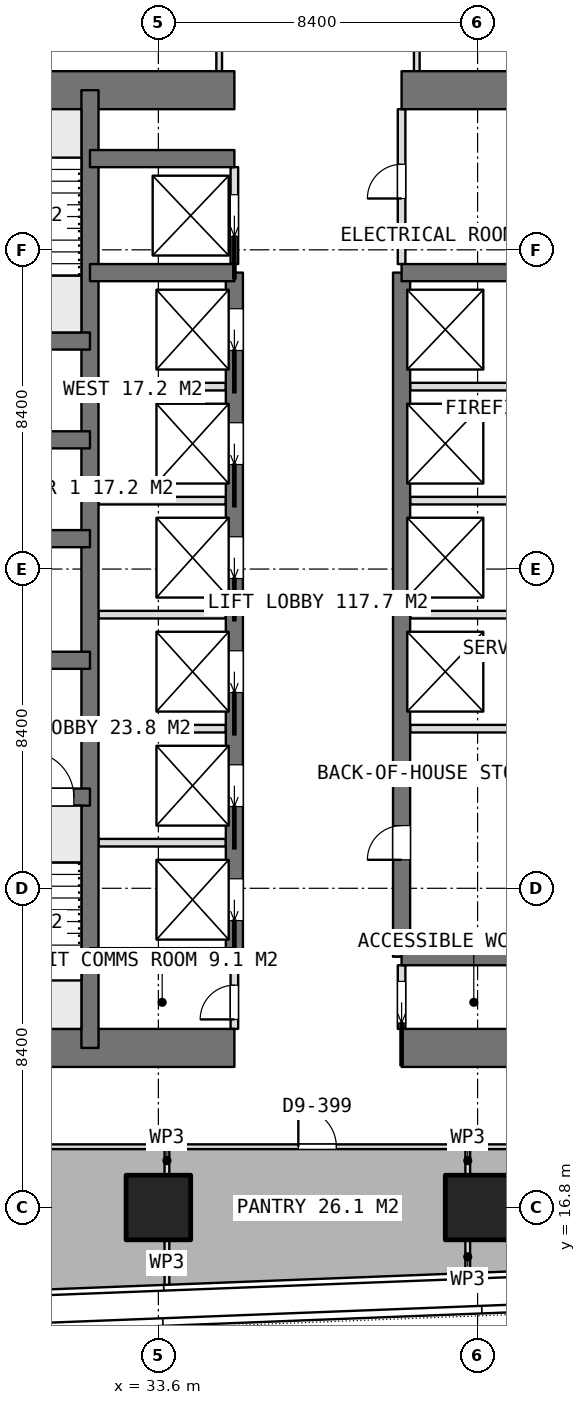
"""IFC4 building model, lengths in metres.
Left out: names, types, materials, properties, quantities, classifications, styles, units other than length and angle.
Written with IfcOpenShell. Run it as: python <this file> out.ifc"""

import sys

from ifc_helpers import new_model, si_unit, direction, frame, frame_2d, origin, origin_2d, place, context, subcontext, project, spatial, rectangle, extrude, element, fill, save


model = new_model("IFC4")
c1 = context("Model", 3, precision=1e-05, world=origin(), true_north=direction((0.0, 1.0)))
c2 = subcontext(c1, "Body", "Model", "MODEL_VIEW")
j1 = project(units=[si_unit("LENGTHUNIT", "METRE"), si_unit("PLANEANGLEUNIT", "RADIAN")], contexts=[c1])
p1 = place(None, origin())
s1 = spatial("IfcSite", under=j1, at=p1, CompositionType="ELEMENT")
p2 = place(p1, origin())
s2 = spatial("IfcBuilding", under=s1, at=p2, CompositionType="ELEMENT")
p3 = place(p2, frame((0.0, 0.0, 114.05)))
s3 = spatial("IfcBuildingStorey", under=s2, at=p3, CompositionType="ELEMENT", Elevation=114.05)
p4 = place(p3, frame((25.2, 21.0, 0.0), z_axis=(0.0, 0.0, 1.0), x_axis=(1.0, 0.0, 0.0)))
e1 = element("IfcWall", 1, at=p4, inside=s3, PredefinedType="SHEAR", context=c2, shape_type="SweptSolid", body=[
    extrude(rectangle(XDim=10.4, YDim=1.0, at=frame_2d((5.2, 0.0))), origin(), (0.0, 0.0, 1.0), 3.75),
])
p5 = place(p3, frame((40.0, 21.0, 0.0), z_axis=(0.0, 0.0, 1.0), x_axis=(1.0, 0.0, 0.0)))
e2 = element("IfcWall", 2, at=p5, inside=s3, PredefinedType="SHEAR", context=c2, shape_type="SweptSolid", body=[
    extrude(rectangle(XDim=10.4, YDim=1.0, at=frame_2d((5.2, 0.0))), origin(), (0.0, 0.0, 1.0), 3.75),
])
p6 = place(p3, frame((25.2, 46.2, 0.0), z_axis=(0.0, 0.0, 1.0), x_axis=(1.0, 0.0, 0.0)))
e3 = element("IfcWall", 3, at=p6, inside=s3, PredefinedType="SHEAR", context=c2, shape_type="SweptSolid", body=[
    extrude(rectangle(XDim=10.4, YDim=1.0, at=frame_2d((5.2, 0.0))), origin(), (0.0, 0.0, 1.0), 3.75),
])
p7 = place(p3, frame((40.0, 46.2, 0.0), z_axis=(0.0, 0.0, 1.0), x_axis=(1.0, 0.0, 0.0)))
e4 = element("IfcWall", 4, at=p7, inside=s3, PredefinedType="SHEAR", context=c2, shape_type="SweptSolid", body=[
    extrude(rectangle(XDim=10.4, YDim=1.0, at=frame_2d((5.2, 0.0))), origin(), (0.0, 0.0, 1.0), 3.75),
])
p8 = place(p3, frame((31.8, 21.0, 0.0), z_axis=(0.0, 0.0, 1.0), x_axis=(0.0, 1.0, 0.0)))
e5 = element("IfcWall", 5, at=p8, inside=s3, PredefinedType="SHEAR", context=c2, shape_type="SweptSolid", body=[
    extrude(rectangle(XDim=25.2, YDim=0.45, at=frame_2d((12.6, 0.0))), origin(), (0.0, 0.0, 1.0), 3.75),
])
p9 = place(p3, frame((35.6, 23.4, 0.0), z_axis=(0.0, 0.0, 1.0), x_axis=(0.0, 1.0, 0.0)))
e6 = element("IfcWall", 6, at=p9, inside=s3, PredefinedType="SHEAR", context=c2, shape_type="SweptSolid", body=[
    extrude(rectangle(XDim=18.0, YDim=0.45, at=frame_2d((9.0, 0.0))), origin(), (0.0, 0.0, 1.0), 3.75),
])
p10 = place(p9, frame((0.95, 0.0, 0.0)))
e7 = element("IfcOpeningElement", 7, at=p10, cuts=e6, PredefinedType="OPENING", context=c2, shape_type="SweptSolid", body=[
    extrude(rectangle(XDim=1.1, YDim=2.1, at=frame_2d((0.55, 1.05))), frame((0.0, 0.235, 0.0), z_axis=(0.0, -1.0, 0.0), x_axis=(1.0, 0.0, 0.0)), (0.0, 0.0, 1.0), 0.47),
])
p11 = place(p9, frame((3.95, 0.0, 0.0)))
e8 = element("IfcOpeningElement", 8, at=p11, cuts=e6, PredefinedType="OPENING", context=c2, shape_type="SweptSolid", body=[
    extrude(rectangle(XDim=1.1, YDim=2.1, at=frame_2d((0.55, 1.05))), frame((0.0, 0.235, 0.0), z_axis=(0.0, -1.0, 0.0), x_axis=(1.0, 0.0, 0.0)), (0.0, 0.0, 1.0), 0.47),
])
p12 = place(p9, frame((6.95, 0.0, 0.0)))
e9 = element("IfcOpeningElement", 9, at=p12, cuts=e6, PredefinedType="OPENING", context=c2, shape_type="SweptSolid", body=[
    extrude(rectangle(XDim=1.1, YDim=2.1, at=frame_2d((0.55, 1.05))), frame((0.0, 0.235, 0.0), z_axis=(0.0, -1.0, 0.0), x_axis=(1.0, 0.0, 0.0)), (0.0, 0.0, 1.0), 0.47),
])
p13 = place(p9, frame((9.95, 0.0, 0.0)))
e10 = element("IfcOpeningElement", 10, at=p13, cuts=e6, PredefinedType="OPENING", context=c2, shape_type="SweptSolid", body=[
    extrude(rectangle(XDim=1.1, YDim=2.1, at=frame_2d((0.55, 1.05))), frame((0.0, 0.235, 0.0), z_axis=(0.0, -1.0, 0.0), x_axis=(1.0, 0.0, 0.0)), (0.0, 0.0, 1.0), 0.47),
])
p14 = place(p9, frame((12.95, 0.0, 0.0)))
e11 = element("IfcOpeningElement", 11, at=p14, cuts=e6, PredefinedType="OPENING", context=c2, shape_type="SweptSolid", body=[
    extrude(rectangle(XDim=1.1, YDim=2.1, at=frame_2d((0.55, 1.05))), frame((0.0, 0.235, 0.0), z_axis=(0.0, -1.0, 0.0), x_axis=(1.0, 0.0, 0.0)), (0.0, 0.0, 1.0), 0.47),
])
p15 = place(p9, frame((15.95, 0.0, 0.0)))
e12 = element("IfcOpeningElement", 12, at=p15, cuts=e6, PredefinedType="OPENING", context=c2, shape_type="SweptSolid", body=[
    extrude(rectangle(XDim=1.1, YDim=2.1, at=frame_2d((0.55, 1.05))), frame((0.0, 0.235, 0.0), z_axis=(0.0, -1.0, 0.0), x_axis=(1.0, 0.0, 0.0)), (0.0, 0.0, 1.0), 0.47),
])
p16 = place(p3, frame((40.0, 23.4, 0.0), z_axis=(0.0, 0.0, 1.0), x_axis=(0.0, 1.0, 0.0)))
e13 = element("IfcWall", 13, at=p16, inside=s3, PredefinedType="SHEAR", context=c2, shape_type="SweptSolid", body=[
    extrude(rectangle(XDim=18.0, YDim=0.45, at=frame_2d((9.0, 0.0))), origin(), (0.0, 0.0, 1.0), 3.75),
])
p17 = place(p16, frame((2.55, 0.0, 0.0)))
e14 = element("IfcOpeningElement", 14, at=p17, cuts=e13, PredefinedType="OPENING", context=c2, shape_type="SweptSolid", body=[
    extrude(rectangle(XDim=0.9, YDim=2.1, at=frame_2d((0.45, 1.05))), frame((0.0, 0.235, 0.0), z_axis=(0.0, -1.0, 0.0), x_axis=(1.0, 0.0, 0.0)), (0.0, 0.0, 1.0), 0.47),
])
for number, where, z_axis, x_axis in (
    (15, (31.8, 23.4, 0.0), (0.0, 0.0, 1.0), (1.0, 0.0, 0.0)),
    (16, (31.8, 41.4, 0.0), (0.0, 0.0, 1.0), (1.0, 0.0, 0.0)),
    (17, (31.8, 44.4, 0.0), (0.0, 0.0, 1.0), (1.0, 0.0, 0.0)),
    (18, (40.0, 23.4, 0.0), (0.0, 0.0, 1.0), (1.0, 0.0, 0.0)),
    (19, (40.0, 41.4, 0.0), (0.0, 0.0, 1.0), (1.0, 0.0, 0.0)),
):
    element("IfcWall", number, at=place(p3, frame(where, z_axis=z_axis, x_axis=x_axis)), inside=s3, PredefinedType="SHEAR", context=c2, shape_type="SweptSolid", body=[
        extrude(rectangle(XDim=3.8, YDim=0.45, at=frame_2d((1.9, 0.0))), origin(), (0.0, 0.0, 1.0), 3.75),
    ])
p18 = place(p3, frame((25.2, 27.6, 0.0), z_axis=(0.0, 0.0, 1.0), x_axis=(1.0, 0.0, 0.0)))
e20 = element("IfcWall", 20, at=p18, inside=s3, PredefinedType="SHEAR", context=c2, shape_type="SweptSolid", body=[
    extrude(rectangle(XDim=6.6, YDim=0.45, at=frame_2d((3.3, 0.0))), origin(), (0.0, 0.0, 1.0), 3.75),
])
p19 = place(p18, frame((4.975, 0.0, 0.0)))
e21 = element("IfcOpeningElement", 21, at=p19, cuts=e20, PredefinedType="OPENING", context=c2, shape_type="SweptSolid", body=[
    extrude(rectangle(XDim=1.2, YDim=2.1, at=frame_2d((0.6, 1.05))), frame((0.0, 0.235, 0.0), z_axis=(0.0, -1.0, 0.0), x_axis=(1.0, 0.0, 0.0)), (0.0, 0.0, 1.0), 0.47),
])
p20 = place(p3, frame((25.2, 31.2, 0.0), z_axis=(0.0, 0.0, 1.0), x_axis=(1.0, 0.0, 0.0)))
e22 = element("IfcWall", 22, at=p20, inside=s3, PredefinedType="SHEAR", context=c2, shape_type="SweptSolid", body=[
    extrude(rectangle(XDim=6.6, YDim=0.45, at=frame_2d((3.3, 0.0))), origin(), (0.0, 0.0, 1.0), 3.75),
])
p21 = place(p20, frame((2.65, 0.0, 0.0)))
e23 = element("IfcOpeningElement", 23, at=p21, cuts=e22, PredefinedType="OPENING", context=c2, shape_type="SweptSolid", body=[
    extrude(rectangle(XDim=1.3, YDim=2.1, at=frame_2d((0.65, 1.05))), frame((0.0, 0.235, 0.0), z_axis=(0.0, -1.0, 0.0), x_axis=(1.0, 0.0, 0.0)), (0.0, 0.0, 1.0), 0.47),
])
for number, where, z_axis, x_axis in (
    (24, (25.2, 34.4, 0.0), (0.0, 0.0, 1.0), (1.0, 0.0, 0.0)),
    (25, (25.2, 37.0, 0.0), (0.0, 0.0, 1.0), (1.0, 0.0, 0.0)),
    (26, (25.2, 39.6, 0.0), (0.0, 0.0, 1.0), (1.0, 0.0, 0.0)),
):
    element("IfcWall", number, at=place(p3, frame(where, z_axis=z_axis, x_axis=x_axis)), inside=s3, PredefinedType="SHEAR", context=c2, shape_type="SweptSolid", body=[
        extrude(rectangle(XDim=6.6, YDim=0.45, at=frame_2d((3.3, 0.0))), origin(), (0.0, 0.0, 1.0), 3.75),
    ])
for number, where, z_axis, x_axis in (
    (27, (33.6, 16.8, 0.0), (0.0, 0.0, 1.0), (1.0, 0.0, 0.0)),
    (28, (42.0, 16.8, 0.0), (0.0, 0.0, 1.0), (1.0, 0.0, 0.0)),
):
    element("IfcColumn", number, at=place(p3, frame(where, z_axis=z_axis, x_axis=x_axis)), inside=s3, PredefinedType="COLUMN", context=c2, shape_type="SweptSolid", body=[
        extrude(rectangle(XDim=1.7, YDim=1.7, at=origin_2d()), origin(), (0.0, 0.0, 1.0), 3.75),
    ])
for number, where, z_axis, x_axis in (
    (29, (32.025, 26.4, 0.0), (0.0, 0.0, 1.0), (1.0, 0.0, 0.0)),
    (30, (32.025, 29.4, 0.0), (0.0, 0.0, 1.0), (1.0, 0.0, 0.0)),
    (31, (32.025, 32.4, 0.0), (0.0, 0.0, 1.0), (1.0, 0.0, 0.0)),
    (32, (32.025, 35.4, 0.0), (0.0, 0.0, 1.0), (1.0, 0.0, 0.0)),
    (33, (32.025, 38.4, 0.0), (0.0, 0.0, 1.0), (1.0, 0.0, 0.0)),
):
    element("IfcWall", number, at=place(p3, frame(where, z_axis=z_axis, x_axis=x_axis)), inside=s3, PredefinedType="PARTITIONING", context=c2, shape_type="SweptSolid", body=[
        extrude(rectangle(XDim=3.35, YDim=0.2, at=frame_2d((1.675, 0.0))), origin(), (0.0, 0.0, 1.0), 3.5),
    ])
for number, where, z_axis, x_axis in (
    (34, (40.225, 29.4, 0.0), (0.0, 0.0, 1.0), (1.0, 0.0, 0.0)),
    (35, (40.225, 32.4, 0.0), (0.0, 0.0, 1.0), (1.0, 0.0, 0.0)),
    (36, (40.225, 35.4, 0.0), (0.0, 0.0, 1.0), (1.0, 0.0, 0.0)),
    (37, (40.225, 38.4, 0.0), (0.0, 0.0, 1.0), (1.0, 0.0, 0.0)),
):
    element("IfcWall", number, at=place(p3, frame(where, z_axis=z_axis, x_axis=x_axis)), inside=s3, PredefinedType="PARTITIONING", context=c2, shape_type="SweptSolid", body=[
        extrude(rectangle(XDim=3.35, YDim=0.2, at=frame_2d((1.675, 0.0))), origin(), (0.0, 0.0, 1.0), 3.5),
    ])
p22 = place(p3, frame((40.0, 21.5, 0.0), z_axis=(0.0, 0.0, 1.0), x_axis=(0.0, 1.0, 0.0)))
e38 = element("IfcWall", 38, at=p22, inside=s3, PredefinedType="PARTITIONING", context=c2, shape_type="SweptSolid", body=[
    extrude(rectangle(XDim=1.675, YDim=0.2, at=frame_2d((0.837, 0.0))), origin(), (0.0, 0.0, 1.0), 3.5),
])
p23 = place(p22, frame((0.15, 0.0, 0.0)))
e39 = element("IfcOpeningElement", 39, at=p23, cuts=e38, PredefinedType="OPENING", context=c2, shape_type="SweptSolid", body=[
    extrude(rectangle(XDim=1.1, YDim=2.1, at=frame_2d((0.55, 1.05))), frame((0.0, 0.11, 0.0), z_axis=(0.0, -1.0, 0.0), x_axis=(1.0, 0.0, 0.0)), (0.0, 0.0, 1.0), 0.22),
])
p24 = place(p3, frame((40.0, 41.625, 0.0), z_axis=(0.0, 0.0, 1.0), x_axis=(0.0, 1.0, 0.0)))
e40 = element("IfcWall", 40, at=p24, inside=s3, PredefinedType="PARTITIONING", context=c2, shape_type="SweptSolid", body=[
    extrude(rectangle(XDim=4.075, YDim=0.2, at=frame_2d((2.038, 0.0))), origin(), (0.0, 0.0, 1.0), 3.5),
])
p25 = place(p24, frame((1.725, 0.0, 0.0)))
e41 = element("IfcOpeningElement", 41, at=p25, cuts=e40, PredefinedType="OPENING", context=c2, shape_type="SweptSolid", body=[
    extrude(rectangle(XDim=0.9, YDim=2.1, at=frame_2d((0.45, 1.05))), frame((0.0, 0.11, 0.0), z_axis=(0.0, -1.0, 0.0), x_axis=(1.0, 0.0, 0.0)), (0.0, 0.0, 1.0), 0.22),
])
p26 = place(p3, frame((35.6, 41.625, 0.0), z_axis=(0.0, 0.0, 1.0), x_axis=(0.0, 1.0, 0.0)))
e42 = element("IfcWall", 42, at=p26, inside=s3, PredefinedType="PARTITIONING", context=c2, shape_type="SweptSolid", body=[
    extrude(rectangle(XDim=2.55, YDim=0.2, at=frame_2d((1.275, 0.0))), origin(), (0.0, 0.0, 1.0), 3.5),
])
p27 = place(p26, frame((0.725, 0.0, 0.0)))
e43 = element("IfcOpeningElement", 43, at=p27, cuts=e42, PredefinedType="OPENING", context=c2, shape_type="SweptSolid", body=[
    extrude(rectangle(XDim=1.1, YDim=2.1, at=frame_2d((0.55, 1.05))), frame((0.0, 0.11, 0.0), z_axis=(0.0, -1.0, 0.0), x_axis=(1.0, 0.0, 0.0)), (0.0, 0.0, 1.0), 0.22),
])
p28 = place(p3, frame((35.6, 21.5, 0.0), z_axis=(0.0, 0.0, 1.0), x_axis=(0.0, 1.0, 0.0)))
e44 = element("IfcWall", 44, at=p28, inside=s3, PredefinedType="PARTITIONING", context=c2, shape_type="SweptSolid", body=[
    extrude(rectangle(XDim=1.675, YDim=0.2, at=frame_2d((0.837, 0.0))), origin(), (0.0, 0.0, 1.0), 3.5),
])
p29 = place(p28, frame((0.25, 0.0, 0.0)))
e45 = element("IfcOpeningElement", 45, at=p29, cuts=e44, PredefinedType="OPENING", context=c2, shape_type="SweptSolid", body=[
    extrude(rectangle(XDim=0.9, YDim=2.1, at=frame_2d((0.45, 1.05))), frame((0.0, 0.11, 0.0), z_axis=(0.0, -1.0, 0.0), x_axis=(1.0, 0.0, 0.0)), (0.0, 0.0, 1.0), 0.22),
])
for number, where, z_axis, x_axis in (
    (46, (40.4, 46.7, 0.0), (0.0, 0.0, 1.0), (0.0, 1.0, 0.0)),
    (47, (35.2, 46.7, 0.0), (0.0, 0.0, 1.0), (0.0, 1.0, 0.0)),
):
    element("IfcWall", number, at=place(p3, frame(where, z_axis=z_axis, x_axis=x_axis)), inside=s3, PredefinedType="PARTITIONING", context=c2, shape_type="SweptSolid", body=[
        extrude(rectangle(XDim=2.625, YDim=0.15, at=frame_2d((1.312, 0.0))), origin(), (0.0, 0.0, 1.0), 3.5),
    ])
p30 = place(p3, frame((41.741, 15.08, 0.0), z_axis=(0.0, 0.0, 1.0), x_axis=(0.0, 1.0, 0.0)))
e48 = element("IfcWall", 48, at=p30, inside=s3, PredefinedType="PARTITIONING", context=c2, shape_type="SweptSolid", body=[
    extrude(rectangle(XDim=0.85, YDim=0.125, at=frame_2d((0.425, 0.0))), origin(), (0.0, 0.0, 1.0), 3.5),
])
p31 = place(p3, frame((41.741, 17.67, 0.0), z_axis=(0.0, 0.0, 1.0), x_axis=(0.0, 1.0, 0.0)))
e49 = element("IfcWall", 49, at=p31, inside=s3, PredefinedType="PARTITIONING", context=c2, shape_type="SweptSolid", body=[
    extrude(rectangle(XDim=0.73, YDim=0.125, at=frame_2d((0.365, 0.0))), origin(), (0.0, 0.0, 1.0), 3.5),
])
p32 = place(p3, frame((41.741, 18.4, 0.0), z_axis=(0.0, 0.0, 1.0), x_axis=(1.0, 0.0, 0.0)))
e50 = element("IfcWall", 50, at=p32, inside=s3, PredefinedType="PARTITIONING", context=c2, shape_type="SweptSolid", body=[
    extrude(rectangle(XDim=8.258, YDim=0.125, at=frame_2d((4.129, 0.0))), origin(), (0.0, 0.0, 1.0), 3.5),
])
p33 = place(p32, frame((3.629, 0.0, 0.0)))
e51 = element("IfcOpeningElement", 51, at=p33, cuts=e50, PredefinedType="OPENING", context=c2, shape_type="SweptSolid", body=[
    extrude(rectangle(XDim=1.0, YDim=2.1, at=frame_2d((0.5, 1.05))), frame((0.0, 0.073, 0.0), z_axis=(0.0, -1.0, 0.0), x_axis=(1.0, 0.0, 0.0)), (0.0, 0.0, 1.0), 0.145),
])
p34 = place(p3, frame((20.461, 18.4, 0.0), z_axis=(0.0, 0.0, 1.0), x_axis=(1.0, 0.0, 0.0)))
e52 = element("IfcWall", 52, at=p34, inside=s3, PredefinedType="PARTITIONING", context=c2, shape_type="SweptSolid", body=[
    extrude(rectangle(XDim=13.364, YDim=0.125, at=frame_2d((6.682, 0.0))), origin(), (0.0, 0.0, 1.0), 3.5),
])
p35 = place(p34, frame((6.252, 0.0, 0.0)))
e53 = element("IfcOpeningElement", 53, at=p35, cuts=e52, PredefinedType="OPENING", context=c2, shape_type="SweptSolid", body=[
    extrude(rectangle(XDim=1.0, YDim=2.1, at=frame_2d((0.5, 1.05))), frame((0.0, 0.073, 0.0), z_axis=(0.0, -1.0, 0.0), x_axis=(1.0, 0.0, 0.0)), (0.0, 0.0, 1.0), 0.145),
])
p36 = place(p3, frame((33.825, 18.4, 0.0), z_axis=(0.0, 0.0, 1.0), x_axis=(0.0, -1.0, 0.0)))
e54 = element("IfcWall", 54, at=p36, inside=s3, PredefinedType="PARTITIONING", context=c2, shape_type="SweptSolid", body=[
    extrude(rectangle(XDim=0.73, YDim=0.125, at=frame_2d((0.365, 0.0))), origin(), (0.0, 0.0, 1.0), 3.5),
])
p37 = place(p3, frame((33.825, 15.93, 0.0), z_axis=(0.0, 0.0, 1.0), x_axis=(0.0, -1.0, 0.0)))
e55 = element("IfcWall", 55, at=p37, inside=s3, PredefinedType="PARTITIONING", context=c2, shape_type="SweptSolid", body=[
    extrude(rectangle(XDim=1.188, YDim=0.125, at=frame_2d((0.594, 0.0))), origin(), (0.0, 0.0, 1.0), 3.5),
])
p38 = place(p3, frame((33.826, 18.4, 0.0), z_axis=(0.0, 0.0, 1.0), x_axis=(1.0, 0.0, 0.0)))
e56 = element("IfcWall", 56, at=p38, inside=s3, PredefinedType="PARTITIONING", context=c2, shape_type="SweptSolid", body=[
    extrude(rectangle(XDim=7.914, YDim=0.125, at=frame_2d((3.957, 0.0))), origin(), (0.0, 0.0, 1.0), 3.5),
])
p39 = place(p38, frame((3.457, 0.0, 0.0)))
e57 = element("IfcOpeningElement", 57, at=p39, cuts=e56, PredefinedType="OPENING", context=c2, shape_type="SweptSolid", body=[
    extrude(rectangle(XDim=1.0, YDim=2.1, at=frame_2d((0.5, 1.05))), frame((0.0, 0.073, 0.0), z_axis=(0.0, -1.0, 0.0), x_axis=(1.0, 0.0, 0.0)), (0.0, 0.0, 1.0), 0.145),
])
p40 = place(p23, origin())
e58 = element("IfcDoor", 58, at=p40, inside=s3, OperationType="SLIDING_TO_LEFT", PredefinedType="DOOR", context=c2, shape_type="SweptSolid", body=[
    extrude(rectangle(XDim=1.1, YDim=2.1, at=frame_2d((0.55, 1.05))), frame((0.0, 0.025, 0.0), z_axis=(0.0, -1.0, 0.0), x_axis=(1.0, 0.0, 0.0)), (0.0, 0.0, 1.0), 0.05),
])
fill(e39, e58)
p41 = place(p29, origin())
e59 = element("IfcDoor", 59, at=p41, inside=s3, OperationType="SINGLE_SWING_LEFT", PredefinedType="DOOR", context=c2, shape_type="SweptSolid", body=[
    extrude(rectangle(XDim=0.9, YDim=2.1, at=frame_2d((0.45, 1.05))), frame((0.0, 0.025, 0.0), z_axis=(0.0, -1.0, 0.0), x_axis=(1.0, 0.0, 0.0)), (0.0, 0.0, 1.0), 0.05),
])
fill(e45, e59)
p42 = place(p25, origin())
e60 = element("IfcDoor", 60, at=p42, inside=s3, OperationType="SINGLE_SWING_LEFT", PredefinedType="DOOR", context=c2, shape_type="SweptSolid", body=[
    extrude(rectangle(XDim=0.9, YDim=2.1, at=frame_2d((0.45, 1.05))), frame((0.0, 0.025, 0.0), z_axis=(0.0, -1.0, 0.0), x_axis=(1.0, 0.0, 0.0)), (0.0, 0.0, 1.0), 0.05),
])
fill(e41, e60)
p43 = place(p17, origin())
e61 = element("IfcDoor", 61, at=p43, inside=s3, OperationType="SINGLE_SWING_LEFT", PredefinedType="DOOR", context=c2, shape_type="SweptSolid", body=[
    extrude(rectangle(XDim=0.9, YDim=2.1, at=frame_2d((0.45, 1.05))), frame((0.0, 0.025, 0.0), z_axis=(0.0, -1.0, 0.0), x_axis=(1.0, 0.0, 0.0)), (0.0, 0.0, 1.0), 0.05),
])
fill(e14, e61)
p44 = place(p10, origin())
e62 = element("IfcDoor", 62, at=p44, inside=s3, OperationType="SLIDING_TO_LEFT", PredefinedType="USERDEFINED", context=c2, shape_type="SweptSolid", body=[
    extrude(rectangle(XDim=1.1, YDim=2.1, at=frame_2d((0.55, 1.05))), frame((0.0, 0.025, 0.0), z_axis=(0.0, -1.0, 0.0), x_axis=(1.0, 0.0, 0.0)), (0.0, 0.0, 1.0), 0.05),
])
fill(e7, e62)
p45 = place(p11, origin())
e63 = element("IfcDoor", 63, at=p45, inside=s3, OperationType="SLIDING_TO_LEFT", PredefinedType="USERDEFINED", context=c2, shape_type="SweptSolid", body=[
    extrude(rectangle(XDim=1.1, YDim=2.1, at=frame_2d((0.55, 1.05))), frame((0.0, 0.025, 0.0), z_axis=(0.0, -1.0, 0.0), x_axis=(1.0, 0.0, 0.0)), (0.0, 0.0, 1.0), 0.05),
])
fill(e8, e63)
p46 = place(p12, origin())
e64 = element("IfcDoor", 64, at=p46, inside=s3, OperationType="SLIDING_TO_LEFT", PredefinedType="USERDEFINED", context=c2, shape_type="SweptSolid", body=[
    extrude(rectangle(XDim=1.1, YDim=2.1, at=frame_2d((0.55, 1.05))), frame((0.0, 0.025, 0.0), z_axis=(0.0, -1.0, 0.0), x_axis=(1.0, 0.0, 0.0)), (0.0, 0.0, 1.0), 0.05),
])
fill(e9, e64)
p47 = place(p13, origin())
e65 = element("IfcDoor", 65, at=p47, inside=s3, OperationType="SLIDING_TO_LEFT", PredefinedType="USERDEFINED", context=c2, shape_type="SweptSolid", body=[
    extrude(rectangle(XDim=1.1, YDim=2.1, at=frame_2d((0.55, 1.05))), frame((0.0, 0.025, 0.0), z_axis=(0.0, -1.0, 0.0), x_axis=(1.0, 0.0, 0.0)), (0.0, 0.0, 1.0), 0.05),
])
fill(e10, e65)
p48 = place(p14, origin())
e66 = element("IfcDoor", 66, at=p48, inside=s3, OperationType="SLIDING_TO_LEFT", PredefinedType="USERDEFINED", context=c2, shape_type="SweptSolid", body=[
    extrude(rectangle(XDim=1.1, YDim=2.1, at=frame_2d((0.55, 1.05))), frame((0.0, 0.025, 0.0), z_axis=(0.0, -1.0, 0.0), x_axis=(1.0, 0.0, 0.0)), (0.0, 0.0, 1.0), 0.05),
])
fill(e11, e66)
p49 = place(p15, origin())
e67 = element("IfcDoor", 67, at=p49, inside=s3, OperationType="SLIDING_TO_LEFT", PredefinedType="USERDEFINED", context=c2, shape_type="SweptSolid", body=[
    extrude(rectangle(XDim=1.1, YDim=2.1, at=frame_2d((0.55, 1.05))), frame((0.0, 0.025, 0.0), z_axis=(0.0, -1.0, 0.0), x_axis=(1.0, 0.0, 0.0)), (0.0, 0.0, 1.0), 0.05),
])
fill(e12, e67)
p50 = place(p27, origin())
e68 = element("IfcDoor", 68, at=p50, inside=s3, OperationType="SLIDING_TO_LEFT", PredefinedType="USERDEFINED", context=c2, shape_type="SweptSolid", body=[
    extrude(rectangle(XDim=1.1, YDim=2.1, at=frame_2d((0.55, 1.05))), frame((0.0, 0.025, 0.0), z_axis=(0.0, -1.0, 0.0), x_axis=(1.0, 0.0, 0.0)), (0.0, 0.0, 1.0), 0.05),
])
fill(e43, e68)
p51 = place(p39, origin())
e69 = element("IfcDoor", 69, at=p51, inside=s3, OperationType="SINGLE_SWING_LEFT", PredefinedType="DOOR", context=c2, shape_type="SweptSolid", body=[
    extrude(rectangle(XDim=1.0, YDim=2.1, at=frame_2d((0.5, 1.05))), frame((0.0, 0.025, 0.0), z_axis=(0.0, -1.0, 0.0), x_axis=(1.0, 0.0, 0.0)), (0.0, 0.0, 1.0), 0.05),
])
fill(e57, e69)
p52 = place(p19, origin())
e70 = element("IfcDoor", 70, at=p52, inside=s3, OperationType="SINGLE_SWING_RIGHT", PredefinedType="DOOR", context=c2, shape_type="SweptSolid", body=[
    extrude(rectangle(XDim=1.2, YDim=2.1, at=frame_2d((0.6, 1.05))), frame((0.0, 0.025, 0.0), z_axis=(0.0, -1.0, 0.0), x_axis=(1.0, 0.0, 0.0)), (0.0, 0.0, 1.0), 0.05),
])
fill(e21, e70)
save(model, sys.argv[1])
